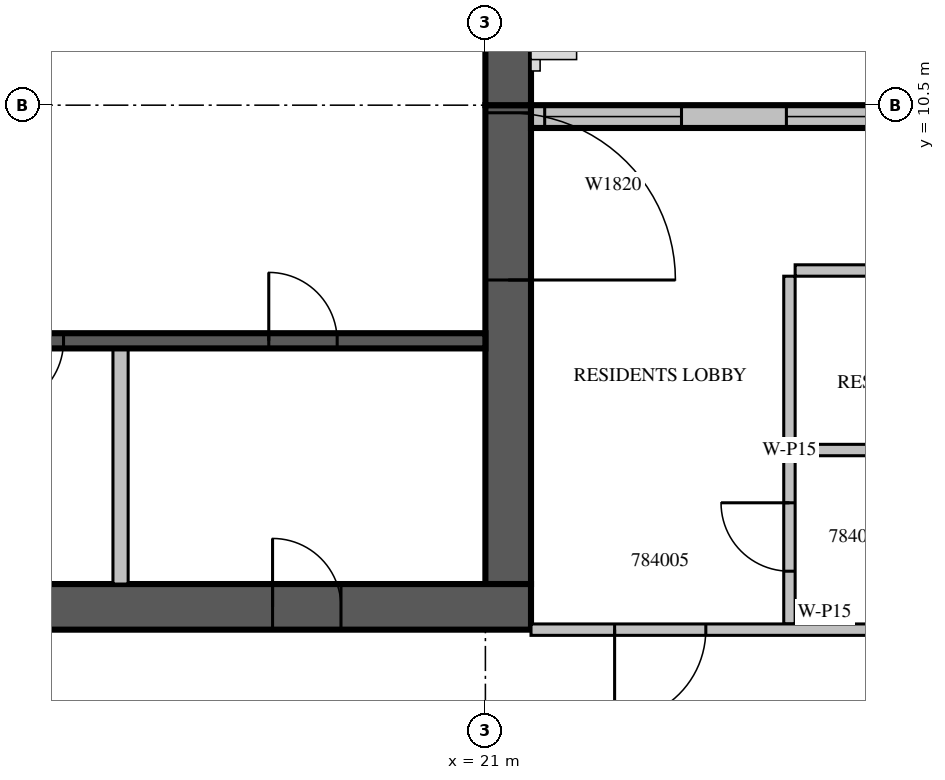
"""IFC4 building model, lengths in metres.
Left out: names, types, materials, properties, quantities, classifications, styles, units other than length and angle.
Written with IfcOpenShell. Run it as: python <this file> out.ifc"""

import sys

from ifc_helpers import new_model, si_unit, direction, frame, frame_2d, origin, place, context, subcontext, project, spatial, rectangle, extrude, source, transform, mapped, element, fill, save


model = new_model("IFC4")
c1 = context("Model", 3, precision=1e-05, world=origin(), true_north=direction((0.0, 1.0)))
c2 = subcontext(c1, "Body", "Model", "MODEL_VIEW")
j1 = project(units=[si_unit("LENGTHUNIT", "METRE"), si_unit("PLANEANGLEUNIT", "RADIAN")], contexts=[c1])
p1 = place(None, origin())
s1 = spatial("IfcSite", under=j1, at=p1, CompositionType="ELEMENT")
p2 = place(p1, origin())
s2 = spatial("IfcBuilding", under=s1, at=p2, CompositionType="ELEMENT")
p3 = place(p2, frame((0.0, 0.0, 354.5)))
s3 = spatial("IfcBuildingStorey", under=s2, at=p3, CompositionType="ELEMENT", Elevation=354.5)
m1 = source(origin(), c2, "Body", "SweptSolid", [
    extrude(rectangle(XDim=6.3, YDim=0.6, at=frame_2d((3.15, 0.0))), origin(), (0.0, 0.0, 1.0), 3.5),
])
p4 = place(p3, frame((21.3, 4.2, 0.0), z_axis=(0.0, 0.0, 1.0), x_axis=(0.0, 1.0, 0.0)))
e1 = element("IfcWall", 1, at=p4, inside=s3, PredefinedType="SHEAR", context=c2, shape_type="MappedRepresentation", body=[
    mapped(m1, transform((0.0, 0.0, 0.0), scale=1.0)),
])
m2 = source(origin(), c2, "Body", "SweptSolid", [
    extrude(rectangle(XDim=2.2, YDim=2.1, at=frame_2d((1.1, 1.05))), frame((0.0, 0.31, 0.0), z_axis=(0.0, -1.0, 0.0), x_axis=(1.0, 0.0, 0.0)), (0.0, 0.0, 1.0), 0.62),
])
p5 = place(p4, frame((4.0, 0.0, 0.0)))
e2 = element("IfcOpeningElement", 2, at=p5, cuts=e1, PredefinedType="OPENING", context=c2, shape_type="MappedRepresentation", body=[
    mapped(m2, transform((0.0, 0.0, 0.0), scale=1.0)),
])
m3 = source(origin(), c2, "Body", "SweptSolid", [
    extrude(rectangle(XDim=17.4, YDim=0.6, at=frame_2d((8.7, 0.0))), origin(), (0.0, 0.0, 1.0), 3.5),
])
p6 = place(p3, frame((4.2, 3.9, 0.0), z_axis=(0.0, 0.0, 1.0), x_axis=(1.0, 0.0, 0.0)))
e3 = element("IfcWall", 3, at=p6, inside=s3, PredefinedType="SHEAR", context=c2, shape_type="MappedRepresentation", body=[
    mapped(m3, transform((0.0, 0.0, 0.0), scale=1.0)),
])
m4 = source(origin(), c2, "Body", "SweptSolid", [
    extrude(rectangle(XDim=0.9, YDim=2.1, at=frame_2d((0.45, 1.05))), frame((0.0, 0.31, 0.0), z_axis=(0.0, -1.0, 0.0), x_axis=(1.0, 0.0, 0.0)), (0.0, 0.0, 1.0), 0.62),
])
p7 = place(p6, frame((14.0, 0.0, 0.0)))
e4 = element("IfcOpeningElement", 4, at=p7, cuts=e3, PredefinedType="OPENING", context=c2, shape_type="MappedRepresentation", body=[
    mapped(m4, transform((0.0, 0.0, 0.0), scale=1.0)),
])
m5 = source(origin(), c2, "Body", "SweptSolid", [
    extrude(rectangle(XDim=10.5, YDim=0.6, at=frame_2d((5.25, 0.0))), origin(), (0.0, 0.0, 1.0), 3.5),
])
p8 = place(p3, frame((21.3, 10.5, 0.0), z_axis=(0.0, 0.0, 1.0), x_axis=(0.0, 1.0, 0.0)))
e5 = element("IfcWall", 5, at=p8, inside=s3, PredefinedType="SHEAR", context=c2, shape_type="MappedRepresentation", body=[
    mapped(m5, transform((0.0, 0.0, 0.0), scale=1.0)),
])
m6 = source(origin(), c2, "Body", "SweptSolid", [
    extrude(rectangle(XDim=1.2, YDim=2.4, at=frame_2d((0.6, 1.2))), frame((0.0, 0.31, 0.0), z_axis=(0.0, -1.0, 0.0), x_axis=(1.0, 0.0, 0.0)), (0.0, 0.0, 1.0), 0.62),
])
p9 = place(p8, frame((5.7, 0.0, 0.6)))
e6 = element("IfcOpeningElement", 6, at=p9, cuts=e5, PredefinedType="OPENING", context=c2, shape_type="MappedRepresentation", body=[
    mapped(m6, transform((0.0, 0.0, 0.0), scale=1.0)),
])
m7 = source(origin(), c2, "Body", "SweptSolid", [
    extrude(rectangle(XDim=7.5, YDim=0.3, at=frame_2d((3.75, 0.0))), origin(), (0.0, 0.0, 1.0), 3.1),
])
p10 = place(p3, frame((29.1, 10.35, 0.0), z_axis=(0.0, 0.0, 1.0), x_axis=(-1.0, 0.0, 0.0)))
e7 = element("IfcWall", 7, at=p10, inside=s3, PredefinedType="STANDARD", context=c2, shape_type="MappedRepresentation", body=[
    mapped(m7, transform((0.0, 0.0, 0.0), scale=1.0)),
])
m8 = source(origin(), c2, "Body", "SweptSolid", [
    extrude(rectangle(XDim=3.0, YDim=2.0, at=frame_2d((1.5, 1.0))), frame((0.0, 0.16, 0.0), z_axis=(0.0, -1.0, 0.0), x_axis=(1.0, 0.0, 0.0)), (0.0, 0.0, 1.0), 0.32),
])
p11 = place(p10, frame((1.14, 0.0, 0.6)))
e8 = element("IfcOpeningElement", 8, at=p11, cuts=e7, PredefinedType="OPENING", context=c2, shape_type="MappedRepresentation", body=[
    mapped(m8, transform((0.0, 0.0, 0.0), scale=1.0)),
])
m9 = source(origin(), c2, "Body", "SweptSolid", [
    extrude(rectangle(XDim=1.8, YDim=2.0, at=frame_2d((0.9, 1.0))), frame((0.0, 0.16, 0.0), z_axis=(0.0, -1.0, 0.0), x_axis=(1.0, 0.0, 0.0)), (0.0, 0.0, 1.0), 0.32),
])
p12 = place(p10, frame((5.52, 0.0, 0.6)))
e9 = element("IfcOpeningElement", 9, at=p12, cuts=e7, PredefinedType="OPENING", context=c2, shape_type="MappedRepresentation", body=[
    mapped(m9, transform((0.0, 0.0, 0.0), scale=1.0)),
])
m10 = source(origin(), c2, "Body", "SweptSolid", [
    extrude(rectangle(XDim=3.1, YDim=0.2, at=frame_2d((1.55, 0.0))), origin(), (0.0, 0.0, 1.0), 3.1),
])
p13 = place(p3, frame((16.2, 4.2, 0.0), z_axis=(0.0, 0.0, 1.0), x_axis=(0.0, 1.0, 0.0)))
e10 = element("IfcWall", 10, at=p13, inside=s3, PredefinedType="PARTITIONING", context=c2, shape_type="MappedRepresentation", body=[
    mapped(m10, transform((0.0, 0.0, 0.0), scale=1.0)),
])
m11 = source(origin(), c2, "Body", "SweptSolid", [
    extrude(rectangle(XDim=7.2, YDim=0.2, at=frame_2d((3.6, 0.0))), origin(), (0.0, 0.0, 1.0), 3.1),
])
p14 = place(p3, frame((13.8, 7.4, 0.0), z_axis=(0.0, 0.0, 1.0), x_axis=(1.0, 0.0, 0.0)))
e11 = element("IfcWall", 11, at=p14, inside=s3, PredefinedType="SOLIDWALL", context=c2, shape_type="MappedRepresentation", body=[
    mapped(m11, transform((0.0, 0.0, 0.0), scale=1.0)),
])
m12 = source(origin(), c2, "Body", "SweptSolid", [
    extrude(rectangle(XDim=0.9, YDim=2.1, at=frame_2d((0.45, 1.05))), frame((0.0, 0.11, 0.0), z_axis=(0.0, -1.0, 0.0), x_axis=(1.0, 0.0, 0.0)), (0.0, 0.0, 1.0), 0.22),
])
p15 = place(p14, frame((0.75, 0.0, 0.0)))
e12 = element("IfcOpeningElement", 12, at=p15, cuts=e11, PredefinedType="OPENING", context=c2, shape_type="MappedRepresentation", body=[
    mapped(m12, transform((0.0, 0.0, 0.0), scale=1.0)),
])
p16 = place(p14, frame((4.35, 0.0, 0.0)))
e13 = element("IfcOpeningElement", 13, at=p16, cuts=e11, PredefinedType="OPENING", context=c2, shape_type="MappedRepresentation", body=[
    mapped(m12, transform((0.0, 0.0, 0.0), scale=1.0)),
])
m13 = source(origin(), c2, "Body", "SweptSolid", [
    extrude(rectangle(XDim=4.575, YDim=0.15, at=frame_2d((2.288, 0.0))), origin(), (0.0, 0.0, 1.0), 3.1),
])
p17 = place(p3, frame((25.0, 8.25, 0.0), z_axis=(0.0, 0.0, 1.0), x_axis=(0.0, -1.0, 0.0)))
e14 = element("IfcWall", 14, at=p17, inside=s3, PredefinedType="PARTITIONING", context=c2, shape_type="MappedRepresentation", body=[
    mapped(m13, transform((0.0, 0.0, 0.0), scale=1.0)),
])
m14 = source(origin(), c2, "Body", "SweptSolid", [
    extrude(rectangle(XDim=0.9, YDim=2.1, at=frame_2d((0.45, 1.05))), frame((0.0, 0.085, 0.0), z_axis=(0.0, -1.0, 0.0), x_axis=(1.0, 0.0, 0.0)), (0.0, 0.0, 1.0), 0.17),
])
p18 = place(p17, frame((2.981, 0.0, 0.0)))
e15 = element("IfcOpeningElement", 15, at=p18, cuts=e14, PredefinedType="OPENING", context=c2, shape_type="MappedRepresentation", body=[
    mapped(m14, transform((0.0, 0.0, 0.0), scale=1.0)),
])
p19 = place(p3, frame((29.325, 8.325, 0.0), z_axis=(0.0, 0.0, 1.0), x_axis=(-1.0, 0.0, 0.0)))
e16 = element("IfcWall", 16, at=p19, inside=s3, PredefinedType="PARTITIONING", context=c2, shape_type="SweptSolid", body=[
    extrude(rectangle(XDim=4.25, YDim=0.15, at=frame_2d((2.125, 0.0))), origin(), (0.0, 0.0, 1.0), 3.1),
])
m15 = source(origin(), c2, "Body", "SweptSolid", [
    extrude(rectangle(XDim=1.0, YDim=2.1, at=frame_2d((0.5, 1.05))), frame((0.0, 0.085, 0.0), z_axis=(0.0, -1.0, 0.0), x_axis=(1.0, 0.0, 0.0)), (0.0, 0.0, 1.0), 0.17),
])
p20 = place(p19, frame((1.625, 0.0, 0.0)))
e17 = element("IfcOpeningElement", 17, at=p20, cuts=e16, PredefinedType="OPENING", context=c2, shape_type="MappedRepresentation", body=[
    mapped(m15, transform((0.0, 0.0, 0.0), scale=1.0)),
])
m16 = source(origin(), c2, "Body", "SweptSolid", [
    extrude(rectangle(XDim=4.25, YDim=0.15, at=frame_2d((2.125, 0.0))), origin(), (0.0, 0.0, 1.0), 3.1),
])
p21 = place(p3, frame((29.325, 5.963, 0.0), z_axis=(0.0, 0.0, 1.0), x_axis=(-1.0, 0.0, 0.0)))
e18 = element("IfcWall", 18, at=p21, inside=s3, PredefinedType="PARTITIONING", context=c2, shape_type="MappedRepresentation", body=[
    mapped(m16, transform((0.0, 0.0, 0.0), scale=1.0)),
])
m17 = source(origin(), c2, "Body", "SweptSolid", [
    extrude(rectangle(XDim=7.725, YDim=0.15, at=frame_2d((3.862, 0.0))), origin(), (0.0, 0.0, 1.0), 3.1),
])
p22 = place(p3, frame((21.6, 3.6, 0.0), z_axis=(0.0, 0.0, 1.0), x_axis=(1.0, 0.0, 0.0)))
e19 = element("IfcWall", 19, at=p22, inside=s3, PredefinedType="PARTITIONING", context=c2, shape_type="MappedRepresentation", body=[
    mapped(m17, transform((0.0, 0.0, 0.0), scale=1.0)),
])
m18 = source(origin(), c2, "Body", "SweptSolid", [
    extrude(rectangle(XDim=1.2, YDim=2.1, at=frame_2d((0.6, 1.05))), frame((0.0, 0.085, 0.0), z_axis=(0.0, -1.0, 0.0), x_axis=(1.0, 0.0, 0.0)), (0.0, 0.0, 1.0), 0.17),
])
p23 = place(p22, frame((1.1, 0.0, 0.0)))
e20 = element("IfcOpeningElement", 20, at=p23, cuts=e19, PredefinedType="OPENING", context=c2, shape_type="MappedRepresentation", body=[
    mapped(m18, transform((0.0, 0.0, 0.0), scale=1.0)),
])
m19 = source(origin(), c2, "Body", "SweptSolid", [
    extrude(rectangle(XDim=3.0, YDim=2.0, at=frame_2d((1.5, 1.0))), frame((0.0, 0.03, 0.0), z_axis=(0.0, -1.0, 0.0), x_axis=(1.0, 0.0, 0.0)), (0.0, 0.0, 1.0), 0.06),
])
p24 = place(p11, origin())
e21 = element("IfcWindow", 21, at=p24, inside=s3, PartitioningType="SINGLE_PANEL", PredefinedType="WINDOW", context=c2, shape_type="MappedRepresentation", body=[
    mapped(m19, transform((0.0, 0.0, 0.0), scale=1.0)),
])
fill(e8, e21)
m20 = source(origin(), c2, "Body", "SweptSolid", [
    extrude(rectangle(XDim=1.8, YDim=2.0, at=frame_2d((0.9, 1.0))), frame((0.0, 0.03, 0.0), z_axis=(0.0, -1.0, 0.0), x_axis=(1.0, 0.0, 0.0)), (0.0, 0.0, 1.0), 0.06),
])
p25 = place(p12, origin())
e22 = element("IfcWindow", 22, at=p25, inside=s3, PartitioningType="SINGLE_PANEL", PredefinedType="WINDOW", context=c2, shape_type="MappedRepresentation", body=[
    mapped(m20, transform((0.0, 0.0, 0.0), scale=1.0)),
])
fill(e9, e22)
m21 = source(origin(), c2, "Body", "SweptSolid", [
    extrude(rectangle(XDim=0.9, YDim=2.1, at=frame_2d((0.45, 1.05))), frame((0.0, 0.025, 0.0), z_axis=(0.0, -1.0, 0.0), x_axis=(1.0, 0.0, 0.0)), (0.0, 0.0, 1.0), 0.05),
])
p26 = place(p15, origin())
e23 = element("IfcDoor", 23, at=p26, inside=s3, OperationType="SINGLE_SWING_RIGHT", PredefinedType="DOOR", context=c2, shape_type="MappedRepresentation", body=[
    mapped(m21, transform((0.0, 0.0, 0.0), scale=1.0)),
])
fill(e12, e23)
p27 = place(p16, origin())
e24 = element("IfcDoor", 24, at=p27, inside=s3, OperationType="SINGLE_SWING_LEFT", PredefinedType="DOOR", context=c2, shape_type="MappedRepresentation", body=[
    mapped(m21, transform((0.0, 0.0, 0.0), scale=1.0)),
])
fill(e13, e24)
m22 = source(origin(), c2, "Body", "SweptSolid", [
    extrude(rectangle(XDim=2.2, YDim=2.1, at=frame_2d((1.1, 1.05))), frame((0.0, 0.025, 0.0), z_axis=(0.0, -1.0, 0.0), x_axis=(1.0, 0.0, 0.0)), (0.0, 0.0, 1.0), 0.05),
])
p28 = place(p5, origin())
e25 = element("IfcDoor", 25, at=p28, inside=s3, OperationType="DOUBLE_DOOR_SINGLE_SWING", PredefinedType="DOOR", context=c2, shape_type="MappedRepresentation", body=[
    mapped(m22, transform((0.0, 0.0, 0.0), scale=1.0)),
])
fill(e2, e25)
p29 = place(p7, origin())
e26 = element("IfcDoor", 26, at=p29, inside=s3, OperationType="SINGLE_SWING_LEFT", PredefinedType="DOOR", context=c2, shape_type="MappedRepresentation", body=[
    mapped(m21, transform((0.0, 0.0, 0.0), scale=1.0)),
])
fill(e4, e26)
p30 = place(p18, origin())
e27 = element("IfcDoor", 27, at=p30, inside=s3, OperationType="SINGLE_SWING_RIGHT", PredefinedType="DOOR", context=c2, shape_type="MappedRepresentation", body=[
    mapped(m21, transform((0.0, 0.0, 0.0), scale=1.0)),
])
fill(e15, e27)
m23 = source(origin(), c2, "Body", "SweptSolid", [
    extrude(rectangle(XDim=1.2, YDim=2.1, at=frame_2d((0.6, 1.05))), frame((0.0, 0.025, 0.0), z_axis=(0.0, -1.0, 0.0), x_axis=(1.0, 0.0, 0.0)), (0.0, 0.0, 1.0), 0.05),
])
p31 = place(p23, origin())
e28 = element("IfcDoor", 28, at=p31, inside=s3, OperationType="SINGLE_SWING_RIGHT", PredefinedType="DOOR", context=c2, shape_type="MappedRepresentation", body=[
    mapped(m23, transform((0.0, 0.0, 0.0), scale=1.0)),
])
fill(e20, e28)
save(model, sys.argv[1])
